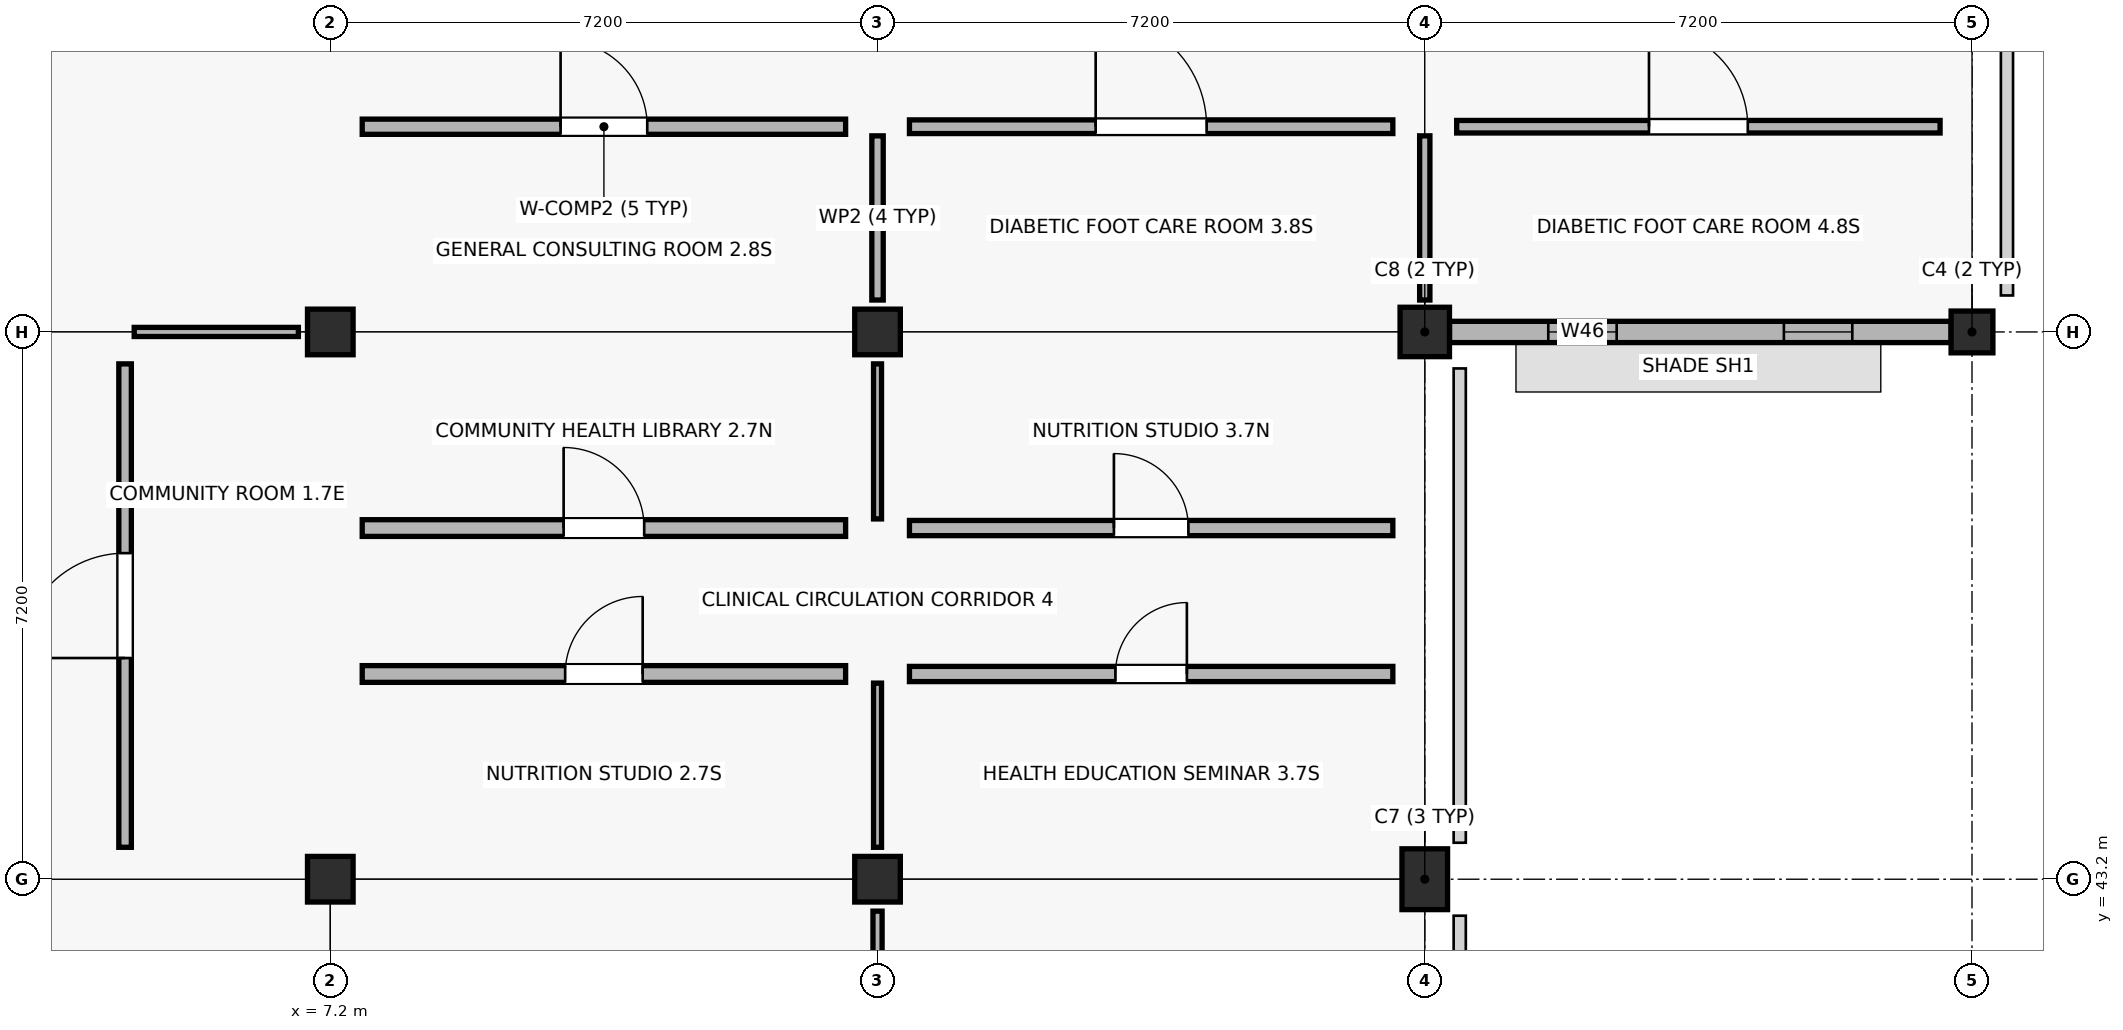
"""IFC4 building model, lengths in metres.
Left out: names, types, materials, properties, quantities, classifications, styles, units other than length and angle.
Written with IfcOpenShell. Run it as: python <this file> out.ifc"""

import sys

from ifc_helpers import new_model, si_unit, direction, frame, frame_2d, origin, origin_2d, place, context, subcontext, project, spatial, rectangle, circle, extrude, element, fill, save


model = new_model("IFC4")
c1 = context("Model", 3, precision=1e-05, world=origin(), true_north=direction((0.0, 1.0)))
c2 = subcontext(c1, "Body", "Model", "MODEL_VIEW")
j1 = project(units=[si_unit("LENGTHUNIT", "METRE"), si_unit("PLANEANGLEUNIT", "RADIAN")], contexts=[c1])
p1 = place(None, origin())
s1 = spatial("IfcSite", under=j1, at=p1, CompositionType="ELEMENT")
p2 = place(p1, origin())
s2 = spatial("IfcBuilding", under=s1, at=p2, CompositionType="ELEMENT")
p3 = place(p2, frame((0.0, 0.0, 4.5)))
s3 = spatial("IfcBuildingStorey", under=s2, at=p3, CompositionType="ELEMENT", Elevation=4.5)
for number, where, z_axis, x_axis in (
    (1, (7.2, 43.2, 0.0), (0.0, 0.0, 1.0), (1.0, 0.0, 0.0)),
    (2, (7.2, 50.4, 0.0), (0.0, 0.0, 1.0), (1.0, 0.0, 0.0)),
    (3, (14.4, 43.2, 0.0), (0.0, 0.0, 1.0), (1.0, 0.0, 0.0)),
    (4, (14.4, 50.4, 0.0), (0.0, 0.0, 1.0), (1.0, 0.0, 0.0)),
):
    element("IfcColumn", number, at=place(p3, frame(where, z_axis=z_axis, x_axis=x_axis)), inside=s3, PredefinedType="COLUMN", context=c2, shape_type="SweptSolid", body=[
        extrude(rectangle(XDim=0.6, YDim=0.6, at=origin_2d()), origin(), (0.0, 0.0, 1.0), 4.5),
    ])
p4 = place(p3, frame((21.6, 43.2, 0.0), z_axis=(0.0, 0.0, 1.0), x_axis=(1.0, 0.0, 0.0)))
e5 = element("IfcColumn", 5, at=p4, inside=s3, PredefinedType="PILASTER", context=c2, shape_type="SweptSolid", body=[
    extrude(rectangle(XDim=0.6, YDim=0.8, at=origin_2d()), origin(), (0.0, 0.0, 1.0), 4.5),
])
p5 = place(p3, frame((21.6, 50.4, 0.0), z_axis=(0.0, 0.0, 1.0), x_axis=(1.0, 0.0, 0.0)))
e6 = element("IfcColumn", 6, at=p5, inside=s3, PredefinedType="COLUMN", context=c2, shape_type="SweptSolid", body=[
    extrude(circle(Radius=0.325, at=origin_2d()), origin(), (0.0, 0.0, 1.0), 4.5),
])
p6 = place(p3, frame((28.8, 50.4, 0.0), z_axis=(0.0, 0.0, 1.0), x_axis=(1.0, 0.0, 0.0)))
e7 = element("IfcColumn", 7, at=p6, inside=s3, PredefinedType="COLUMN", context=c2, shape_type="SweptSolid", body=[
    extrude(rectangle(XDim=0.55, YDim=0.55, at=origin_2d()), origin(), (0.0, 0.0, 1.0), 4.5),
])
p7 = place(p3, frame((21.925, 50.4, 0.0), z_axis=(0.0, 0.0, 1.0), x_axis=(1.0, 0.0, 0.0)))
e8 = element("IfcWall", 8, at=p7, inside=s3, PredefinedType="STANDARD", context=c2, shape_type="SweptSolid", body=[
    extrude(rectangle(XDim=6.6, YDim=0.28, at=frame_2d((3.3, 0.0))), origin(), (0.0, 0.0, 1.0), 3.47),
])
p8 = place(p7, frame((1.3, 0.0, 0.9)))
e9 = element("IfcOpeningElement", 9, at=p8, cuts=e8, PredefinedType="OPENING", context=c2, shape_type="SweptSolid", body=[
    extrude(rectangle(XDim=0.9, YDim=1.88, at=frame_2d((0.45, 0.94))), frame((0.0, 0.15, 0.0), z_axis=(0.0, -1.0, 0.0), x_axis=(1.0, 0.0, 0.0)), (0.0, 0.0, 1.0), 0.3),
])
p9 = place(p7, frame((4.4, 0.0, 0.9)))
e10 = element("IfcOpeningElement", 10, at=p9, cuts=e8, PredefinedType="OPENING", context=c2, shape_type="SweptSolid", body=[
    extrude(rectangle(XDim=0.9, YDim=1.88, at=frame_2d((0.45, 0.94))), frame((0.0, 0.15, 0.0), z_axis=(0.0, -1.0, 0.0), x_axis=(1.0, 0.0, 0.0)), (0.0, 0.0, 1.0), 0.3),
])
p10 = place(p3, frame((7.62, 53.1, 0.0), z_axis=(0.0, 0.0, 1.0), x_axis=(1.0, 0.0, 0.0)))
e11 = element("IfcWall", 11, at=p10, inside=s3, PredefinedType="SOLIDWALL", context=c2, shape_type="SweptSolid", body=[
    extrude(rectangle(XDim=6.36, YDim=0.2, at=frame_2d((3.18, 0.0))), origin(), (0.0, 0.0, 1.0), 3.36),
])
p11 = place(p10, frame((2.61, 0.0, 0.0)))
e12 = element("IfcOpeningElement", 12, at=p11, cuts=e11, PredefinedType="OPENING", context=c2, shape_type="SweptSolid", body=[
    extrude(rectangle(XDim=1.14, YDim=2.19, at=frame_2d((0.57, 1.095))), frame((0.0, 0.11, 0.0), z_axis=(0.0, -1.0, 0.0), x_axis=(1.0, 0.0, 0.0)), (0.0, 0.0, 1.0), 0.22),
])
p12 = place(p3, frame((14.4, 50.82, 0.0), z_axis=(0.0, 0.0, 1.0), x_axis=(0.0, 1.0, 0.0)))
e13 = element("IfcWall", 13, at=p12, inside=s3, PredefinedType="PARTITIONING", context=c2, shape_type="SweptSolid", body=[
    extrude(rectangle(XDim=2.16, YDim=0.15, at=frame_2d((1.08, 0.0))), origin(), (0.0, 0.0, 1.0), 3.36),
])
p13 = place(p3, frame((14.82, 53.1, 0.0), z_axis=(0.0, 0.0, 1.0), x_axis=(1.0, 0.0, 0.0)))
e14 = element("IfcWall", 14, at=p13, inside=s3, PredefinedType="PARTITIONING", context=c2, shape_type="SweptSolid", body=[
    extrude(rectangle(XDim=6.36, YDim=0.18, at=frame_2d((3.18, 0.0))), origin(), (0.0, 0.0, 1.0), 3.36),
])
p14 = place(p13, frame((2.45, 0.0, 0.0)))
e15 = element("IfcOpeningElement", 15, at=p14, cuts=e14, PredefinedType="OPENING", context=c2, shape_type="SweptSolid", body=[
    extrude(rectangle(XDim=1.46, YDim=2.19, at=frame_2d((0.73, 1.095))), frame((0.0, 0.1, 0.0), z_axis=(0.0, -1.0, 0.0), x_axis=(1.0, 0.0, 0.0)), (0.0, 0.0, 1.0), 0.2),
])
p15 = place(p3, frame((21.6, 50.82, 0.0), z_axis=(0.0, 0.0, 1.0), x_axis=(0.0, 1.0, 0.0)))
e16 = element("IfcWall", 16, at=p15, inside=s3, PredefinedType="PARTITIONING", context=c2, shape_type="SweptSolid", body=[
    extrude(rectangle(XDim=2.16, YDim=0.135, at=frame_2d((1.08, 0.0))), origin(), (0.0, 0.0, 1.0), 3.36),
])
p16 = place(p3, frame((22.02, 53.1, 0.0), z_axis=(0.0, 0.0, 1.0), x_axis=(1.0, 0.0, 0.0)))
e17 = element("IfcWall", 17, at=p16, inside=s3, PredefinedType="PARTITIONING", context=c2, shape_type="SweptSolid", body=[
    extrude(rectangle(XDim=6.36, YDim=0.165, at=frame_2d((3.18, 0.0))), origin(), (0.0, 0.0, 1.0), 3.36),
])
p17 = place(p16, frame((2.53, 0.0, 0.0)))
e18 = element("IfcOpeningElement", 18, at=p17, cuts=e17, PredefinedType="OPENING", context=c2, shape_type="SweptSolid", body=[
    extrude(rectangle(XDim=1.3, YDim=2.15, at=frame_2d((0.65, 1.075))), frame((0.0, 0.093, 0.0), z_axis=(0.0, -1.0, 0.0), x_axis=(1.0, 0.0, 0.0)), (0.0, 0.0, 1.0), 0.185),
])
p18 = place(p3, frame((4.5, 43.62, 0.0), z_axis=(0.0, 0.0, 1.0), x_axis=(0.0, 1.0, 0.0)))
e19 = element("IfcWall", 19, at=p18, inside=s3, PredefinedType="PARTITIONING", context=c2, shape_type="SweptSolid", body=[
    extrude(rectangle(XDim=6.36, YDim=0.165, at=frame_2d((3.18, 0.0))), origin(), (0.0, 0.0, 1.0), 3.36),
])
p19 = place(p18, frame((2.49, 0.0, 0.0)))
e20 = element("IfcOpeningElement", 20, at=p19, cuts=e19, PredefinedType="OPENING", context=c2, shape_type="SweptSolid", body=[
    extrude(rectangle(XDim=1.38, YDim=2.04, at=frame_2d((0.69, 1.02))), frame((0.0, 0.093, 0.0), z_axis=(0.0, -1.0, 0.0), x_axis=(1.0, 0.0, 0.0)), (0.0, 0.0, 1.0), 0.185),
])
p20 = place(p3, frame((4.62, 50.4, 0.0), z_axis=(0.0, 0.0, 1.0), x_axis=(1.0, 0.0, 0.0)))
e21 = element("IfcWall", 21, at=p20, inside=s3, PredefinedType="PARTITIONING", context=c2, shape_type="SweptSolid", body=[
    extrude(rectangle(XDim=2.16, YDim=0.12, at=frame_2d((1.08, 0.0))), origin(), (0.0, 0.0, 1.0), 3.36),
])
p21 = place(p3, frame((14.4, 40.74, 0.0), z_axis=(0.0, 0.0, 1.0), x_axis=(0.0, 1.0, 0.0)))
e22 = element("IfcWall", 22, at=p21, inside=s3, PredefinedType="PARTITIONING", context=c2, shape_type="SweptSolid", body=[
    extrude(rectangle(XDim=2.04, YDim=0.12, at=frame_2d((1.02, 0.0))), origin(), (0.0, 0.0, 1.0), 3.36),
])
p22 = place(p3, frame((7.62, 45.9, 0.0), z_axis=(0.0, 0.0, 1.0), x_axis=(1.0, 0.0, 0.0)))
e23 = element("IfcWall", 23, at=p22, inside=s3, PredefinedType="SOLIDWALL", context=c2, shape_type="SweptSolid", body=[
    extrude(rectangle(XDim=6.36, YDim=0.22, at=frame_2d((3.18, 0.0))), origin(), (0.0, 0.0, 1.0), 3.36),
])
p23 = place(p22, frame((2.67, 0.0, 0.0)))
e24 = element("IfcOpeningElement", 24, at=p23, cuts=e23, PredefinedType="OPENING", context=c2, shape_type="SweptSolid", body=[
    extrude(rectangle(XDim=1.02, YDim=2.09, at=frame_2d((0.51, 1.045))), frame((0.0, 0.12, 0.0), z_axis=(0.0, -1.0, 0.0), x_axis=(1.0, 0.0, 0.0)), (0.0, 0.0, 1.0), 0.24),
])
p24 = place(p3, frame((14.4, 43.62, 0.0), z_axis=(0.0, 0.0, 1.0), x_axis=(0.0, 1.0, 0.0)))
e25 = element("IfcWall", 25, at=p24, inside=s3, PredefinedType="PARTITIONING", context=c2, shape_type="SweptSolid", body=[
    extrude(rectangle(XDim=2.16, YDim=0.105, at=frame_2d((1.08, 0.0))), origin(), (0.0, 0.0, 1.0), 3.36),
])
p25 = place(p3, frame((7.62, 47.82, 0.0), z_axis=(0.0, 0.0, 1.0), x_axis=(1.0, 0.0, 0.0)))
e26 = element("IfcWall", 26, at=p25, inside=s3, PredefinedType="SOLIDWALL", context=c2, shape_type="SweptSolid", body=[
    extrude(rectangle(XDim=6.36, YDim=0.22, at=frame_2d((3.18, 0.0))), origin(), (0.0, 0.0, 1.0), 3.36),
])
p26 = place(p25, frame((2.65, 0.0, 0.0)))
e27 = element("IfcOpeningElement", 27, at=p26, cuts=e26, PredefinedType="OPENING", context=c2, shape_type="SweptSolid", body=[
    extrude(rectangle(XDim=1.06, YDim=2.09, at=frame_2d((0.53, 1.045))), frame((0.0, 0.12, 0.0), z_axis=(0.0, -1.0, 0.0), x_axis=(1.0, 0.0, 0.0)), (0.0, 0.0, 1.0), 0.24),
])
p27 = place(p3, frame((14.4, 47.94, 0.0), z_axis=(0.0, 0.0, 1.0), x_axis=(0.0, 1.0, 0.0)))
e28 = element("IfcWall", 28, at=p27, inside=s3, PredefinedType="PARTITIONING", context=c2, shape_type="SweptSolid", body=[
    extrude(rectangle(XDim=2.04, YDim=0.105, at=frame_2d((1.02, 0.0))), origin(), (0.0, 0.0, 1.0), 3.36),
])
p28 = place(p3, frame((14.82, 45.9, 0.0), z_axis=(0.0, 0.0, 1.0), x_axis=(1.0, 0.0, 0.0)))
e29 = element("IfcWall", 29, at=p28, inside=s3, PredefinedType="SOLIDWALL", context=c2, shape_type="SweptSolid", body=[
    extrude(rectangle(XDim=6.36, YDim=0.2, at=frame_2d((3.18, 0.0))), origin(), (0.0, 0.0, 1.0), 3.36),
])
p29 = place(p28, frame((2.71, 0.0, 0.0)))
e30 = element("IfcOpeningElement", 30, at=p29, cuts=e29, PredefinedType="OPENING", context=c2, shape_type="SweptSolid", body=[
    extrude(rectangle(XDim=0.94, YDim=2.14, at=frame_2d((0.47, 1.07))), frame((0.0, 0.11, 0.0), z_axis=(0.0, -1.0, 0.0), x_axis=(1.0, 0.0, 0.0)), (0.0, 0.0, 1.0), 0.22),
])
p30 = place(p3, frame((14.82, 47.82, 0.0), z_axis=(0.0, 0.0, 1.0), x_axis=(1.0, 0.0, 0.0)))
e31 = element("IfcWall", 31, at=p30, inside=s3, PredefinedType="SOLIDWALL", context=c2, shape_type="SweptSolid", body=[
    extrude(rectangle(XDim=6.36, YDim=0.2, at=frame_2d((3.18, 0.0))), origin(), (0.0, 0.0, 1.0), 3.36),
])
p31 = place(p30, frame((2.69, 0.0, 0.0)))
e32 = element("IfcOpeningElement", 32, at=p31, cuts=e31, PredefinedType="OPENING", context=c2, shape_type="SweptSolid", body=[
    extrude(rectangle(XDim=0.98, YDim=2.14, at=frame_2d((0.49, 1.07))), frame((0.0, 0.11, 0.0), z_axis=(0.0, -1.0, 0.0), x_axis=(1.0, 0.0, 0.0)), (0.0, 0.0, 1.0), 0.22),
])
p32 = place(p8, origin())
e33 = element("IfcWindow", 33, at=p32, inside=s3, PartitioningType="SINGLE_PANEL", PredefinedType="WINDOW", context=c2, shape_type="SweptSolid", body=[
    extrude(rectangle(XDim=0.9, YDim=1.88, at=frame_2d((0.45, 0.94))), frame((0.0, 0.03, 0.0), z_axis=(0.0, -1.0, 0.0), x_axis=(1.0, 0.0, 0.0)), (0.0, 0.0, 1.0), 0.06),
])
fill(e9, e33)
p33 = place(p9, origin())
e34 = element("IfcWindow", 34, at=p33, inside=s3, PartitioningType="SINGLE_PANEL", PredefinedType="WINDOW", context=c2, shape_type="SweptSolid", body=[
    extrude(rectangle(XDim=0.9, YDim=1.88, at=frame_2d((0.45, 0.94))), frame((0.0, 0.03, 0.0), z_axis=(0.0, -1.0, 0.0), x_axis=(1.0, 0.0, 0.0)), (0.0, 0.0, 1.0), 0.06),
])
fill(e10, e34)
p34 = place(p11, origin())
e35 = element("IfcDoor", 35, at=p34, inside=s3, OperationType="SINGLE_SWING_LEFT", PredefinedType="DOOR", context=c2, shape_type="SweptSolid", body=[
    extrude(rectangle(XDim=1.14, YDim=2.19, at=frame_2d((0.57, 1.095))), frame((0.0, 0.025, 0.0), z_axis=(0.0, -1.0, 0.0), x_axis=(1.0, 0.0, 0.0)), (0.0, 0.0, 1.0), 0.05),
])
fill(e12, e35)
p35 = place(p14, origin())
e36 = element("IfcDoor", 36, at=p35, inside=s3, OperationType="SINGLE_SWING_LEFT", PredefinedType="DOOR", context=c2, shape_type="SweptSolid", body=[
    extrude(rectangle(XDim=1.46, YDim=2.19, at=frame_2d((0.73, 1.095))), frame((0.0, 0.025, 0.0), z_axis=(0.0, -1.0, 0.0), x_axis=(1.0, 0.0, 0.0)), (0.0, 0.0, 1.0), 0.05),
])
fill(e15, e36)
p36 = place(p17, origin())
e37 = element("IfcDoor", 37, at=p36, inside=s3, OperationType="SINGLE_SWING_LEFT", PredefinedType="DOOR", context=c2, shape_type="SweptSolid", body=[
    extrude(rectangle(XDim=1.3, YDim=2.15, at=frame_2d((0.65, 1.075))), frame((0.0, 0.025, 0.0), z_axis=(0.0, -1.0, 0.0), x_axis=(1.0, 0.0, 0.0)), (0.0, 0.0, 1.0), 0.05),
])
fill(e18, e37)
p37 = place(p19, origin())
e38 = element("IfcDoor", 38, at=p37, inside=s3, OperationType="SINGLE_SWING_LEFT", PredefinedType="DOOR", context=c2, shape_type="SweptSolid", body=[
    extrude(rectangle(XDim=1.38, YDim=2.04, at=frame_2d((0.69, 1.02))), frame((0.0, 0.025, 0.0), z_axis=(0.0, -1.0, 0.0), x_axis=(1.0, 0.0, 0.0)), (0.0, 0.0, 1.0), 0.05),
])
fill(e20, e38)
p38 = place(p23, origin())
e39 = element("IfcDoor", 39, at=p38, inside=s3, OperationType="SINGLE_SWING_RIGHT", PredefinedType="DOOR", context=c2, shape_type="SweptSolid", body=[
    extrude(rectangle(XDim=1.02, YDim=2.09, at=frame_2d((0.51, 1.045))), frame((0.0, 0.025, 0.0), z_axis=(0.0, -1.0, 0.0), x_axis=(1.0, 0.0, 0.0)), (0.0, 0.0, 1.0), 0.05),
])
fill(e24, e39)
p39 = place(p26, origin())
e40 = element("IfcDoor", 40, at=p39, inside=s3, OperationType="SINGLE_SWING_LEFT", PredefinedType="DOOR", context=c2, shape_type="SweptSolid", body=[
    extrude(rectangle(XDim=1.06, YDim=2.09, at=frame_2d((0.53, 1.045))), frame((0.0, 0.025, 0.0), z_axis=(0.0, -1.0, 0.0), x_axis=(1.0, 0.0, 0.0)), (0.0, 0.0, 1.0), 0.05),
])
fill(e27, e40)
p40 = place(p29, origin())
e41 = element("IfcDoor", 41, at=p40, inside=s3, OperationType="SINGLE_SWING_RIGHT", PredefinedType="DOOR", context=c2, shape_type="SweptSolid", body=[
    extrude(rectangle(XDim=0.94, YDim=2.14, at=frame_2d((0.47, 1.07))), frame((0.0, 0.025, 0.0), z_axis=(0.0, -1.0, 0.0), x_axis=(1.0, 0.0, 0.0)), (0.0, 0.0, 1.0), 0.05),
])
fill(e30, e41)
p41 = place(p31, origin())
e42 = element("IfcDoor", 42, at=p41, inside=s3, OperationType="SINGLE_SWING_LEFT", PredefinedType="DOOR", context=c2, shape_type="SweptSolid", body=[
    extrude(rectangle(XDim=0.98, YDim=2.14, at=frame_2d((0.49, 1.07))), frame((0.0, 0.025, 0.0), z_axis=(0.0, -1.0, 0.0), x_axis=(1.0, 0.0, 0.0)), (0.0, 0.0, 1.0), 0.05),
])
fill(e32, e42)
save(model, sys.argv[1])
